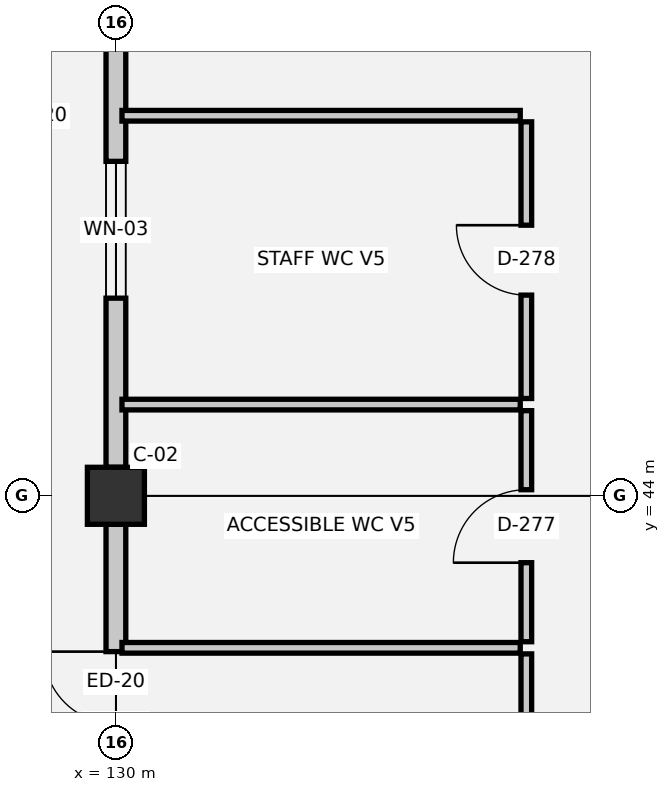
"""IFC4 building model, lengths in metres.
Left out: names, types, materials, properties, quantities, classifications, styles, units other than length and angle.
Written with IfcOpenShell. Run it as: python <this file> out.ifc"""

import sys

from ifc_helpers import new_model, si_unit, direction, frame, frame_2d, origin, origin_2d, place, context, subcontext, project, spatial, rectangle, extrude, element, fill, save


model = new_model("IFC4")
c1 = context("Model", 3, precision=1e-05, world=origin(), true_north=direction((0.0, 1.0)))
c2 = subcontext(c1, "Body", "Model", "MODEL_VIEW")
j1 = project(units=[si_unit("LENGTHUNIT", "METRE"), si_unit("PLANEANGLEUNIT", "RADIAN")], contexts=[c1])
p1 = place(None, origin())
s1 = spatial("IfcSite", under=j1, at=p1, CompositionType="ELEMENT")
p2 = place(p1, origin())
s2 = spatial("IfcBuilding", under=s1, at=p2, CompositionType="ELEMENT")
p3 = place(p2, origin())
s3 = spatial("IfcBuildingStorey", under=s2, at=p3, CompositionType="ELEMENT", Elevation=0.0)
p4 = place(p3, frame((130.0, 44.0, 0.0), z_axis=(0.0, 0.0, 1.0), x_axis=(1.0, 0.0, 0.0)))
e1 = element("IfcColumn", 1, at=p4, inside=s3, PredefinedType="COLUMN", context=c2, shape_type="SweptSolid", body=[
    extrude(rectangle(XDim=0.75, YDim=0.75, at=origin_2d()), origin(), (0.0, 0.0, 1.0), 5.4),
])
p5 = place(p3, frame((130.0, 38.375, 0.0), z_axis=(0.0, 0.0, 1.0), x_axis=(0.0, 1.0, 0.0)))
e2 = element("IfcWall", 2, at=p5, inside=s3, PredefinedType="SOLIDWALL", context=c2, shape_type="SweptSolid", body=[
    extrude(rectangle(XDim=5.25, YDim=0.26, at=frame_2d((2.625, 0.0))), origin(), (0.0, 0.0, 1.0), 4.13),
])
p6 = place(p5, frame((1.675, 0.0, 0.0)))
e3 = element("IfcOpeningElement", 3, at=p6, cuts=e2, PredefinedType="OPENING", context=c2, shape_type="SweptSolid", body=[
    extrude(rectangle(XDim=1.9, YDim=2.25, at=frame_2d((0.95, 1.125))), frame((0.0, 0.14, 0.0), z_axis=(0.0, -1.0, 0.0), x_axis=(1.0, 0.0, 0.0)), (0.0, 0.0, 1.0), 0.28),
])
p7 = place(p3, frame((130.0, 44.375, 0.0), z_axis=(0.0, 0.0, 1.0), x_axis=(0.0, 1.0, 0.0)))
e4 = element("IfcWall", 4, at=p7, inside=s3, PredefinedType="SOLIDWALL", context=c2, shape_type="SweptSolid", body=[
    extrude(rectangle(XDim=6.25, YDim=0.26, at=frame_2d((3.125, 0.0))), origin(), (0.0, 0.0, 1.0), 4.13),
])
p8 = place(p7, frame((2.225, 0.0, 0.9)))
e5 = element("IfcOpeningElement", 5, at=p8, cuts=e4, PredefinedType="OPENING", context=c2, shape_type="SweptSolid", body=[
    extrude(rectangle(XDim=1.8, YDim=2.0, at=frame_2d((0.9, 1.0))), frame((0.0, 0.14, 0.0), z_axis=(0.0, -1.0, 0.0), x_axis=(1.0, 0.0, 0.0)), (0.0, 0.0, 1.0), 0.28),
])
for number, where, z_axis, x_axis in (
    (6, (130.08, 42.0, 0.0), (0.0, 0.0, 1.0), (1.0, 0.0, 0.0)),
    (7, (130.08, 45.2, 0.0), (0.0, 0.0, 1.0), (1.0, 0.0, 0.0)),
    (8, (130.08, 49.0, 0.0), (0.0, 0.0, 1.0), (1.0, 0.0, 0.0)),
):
    element("IfcWall", number, at=place(p3, frame(where, z_axis=z_axis, x_axis=x_axis)), inside=s3, PredefinedType="PLUMBINGWALL", context=c2, shape_type="SweptSolid", body=[
        extrude(rectangle(XDim=5.24, YDim=0.14, at=frame_2d((2.62, 0.0))), origin(), (0.0, 0.0, 1.0), 5.04),
    ])
p9 = place(p3, frame((135.4, 38.08, 0.0), z_axis=(0.0, 0.0, 1.0), x_axis=(0.0, 1.0, 0.0)))
e9 = element("IfcWall", 9, at=p9, inside=s3, PredefinedType="PLUMBINGWALL", context=c2, shape_type="SweptSolid", body=[
    extrude(rectangle(XDim=3.84, YDim=0.14, at=frame_2d((1.92, 0.0))), origin(), (0.0, 0.0, 1.0), 5.04),
])
p10 = place(p9, frame((1.46, 0.0, 0.0)))
e10 = element("IfcOpeningElement", 10, at=p10, cuts=e9, PredefinedType="OPENING", context=c2, shape_type="SweptSolid", body=[
    extrude(rectangle(XDim=0.92, YDim=2.1, at=frame_2d((0.46, 1.05))), frame((0.0, 0.08, 0.0), z_axis=(0.0, -1.0, 0.0), x_axis=(1.0, 0.0, 0.0)), (0.0, 0.0, 1.0), 0.16),
])
p11 = place(p3, frame((135.4, 42.08, 0.0), z_axis=(0.0, 0.0, 1.0), x_axis=(0.0, 1.0, 0.0)))
e11 = element("IfcWall", 11, at=p11, inside=s3, PredefinedType="PLUMBINGWALL", context=c2, shape_type="SweptSolid", body=[
    extrude(rectangle(XDim=3.04, YDim=0.14, at=frame_2d((1.52, 0.0))), origin(), (0.0, 0.0, 1.0), 5.04),
])
p12 = place(p11, frame((1.04, 0.0, 0.0)))
e12 = element("IfcOpeningElement", 12, at=p12, cuts=e11, PredefinedType="OPENING", context=c2, shape_type="SweptSolid", body=[
    extrude(rectangle(XDim=0.96, YDim=2.1, at=frame_2d((0.48, 1.05))), frame((0.0, 0.08, 0.0), z_axis=(0.0, -1.0, 0.0), x_axis=(1.0, 0.0, 0.0)), (0.0, 0.0, 1.0), 0.16),
])
p13 = place(p3, frame((135.4, 45.28, 0.0), z_axis=(0.0, 0.0, 1.0), x_axis=(0.0, 1.0, 0.0)))
e13 = element("IfcWall", 13, at=p13, inside=s3, PredefinedType="PLUMBINGWALL", context=c2, shape_type="SweptSolid", body=[
    extrude(rectangle(XDim=3.64, YDim=0.14, at=frame_2d((1.82, 0.0))), origin(), (0.0, 0.0, 1.0), 5.04),
])
p14 = place(p13, frame((1.36, 0.0, 0.0)))
e14 = element("IfcOpeningElement", 14, at=p14, cuts=e13, PredefinedType="OPENING", context=c2, shape_type="SweptSolid", body=[
    extrude(rectangle(XDim=0.92, YDim=2.1, at=frame_2d((0.46, 1.05))), frame((0.0, 0.08, 0.0), z_axis=(0.0, -1.0, 0.0), x_axis=(1.0, 0.0, 0.0)), (0.0, 0.0, 1.0), 0.16),
])
p15 = place(p6, origin())
e15 = element("IfcDoor", 15, at=p15, inside=s3, OperationType="DOUBLE_DOOR_SINGLE_SWING", PredefinedType="DOOR", context=c2, shape_type="SweptSolid", body=[
    extrude(rectangle(XDim=1.9, YDim=2.25, at=frame_2d((0.95, 1.125))), frame((0.0, 0.025, 0.0), z_axis=(0.0, -1.0, 0.0), x_axis=(1.0, 0.0, 0.0)), (0.0, 0.0, 1.0), 0.05),
])
fill(e3, e15)
p16 = place(p8, origin())
e16 = element("IfcWindow", 16, at=p16, inside=s3, PartitioningType="SINGLE_PANEL", PredefinedType="WINDOW", context=c2, shape_type="SweptSolid", body=[
    extrude(rectangle(XDim=1.8, YDim=2.0, at=frame_2d((0.9, 1.0))), frame((0.0, 0.03, 0.0), z_axis=(0.0, -1.0, 0.0), x_axis=(1.0, 0.0, 0.0)), (0.0, 0.0, 1.0), 0.06),
])
fill(e5, e16)
p17 = place(p12, origin())
e17 = element("IfcDoor", 17, at=p17, inside=s3, OperationType="SINGLE_SWING_LEFT", PredefinedType="DOOR", context=c2, shape_type="SweptSolid", body=[
    extrude(rectangle(XDim=0.96, YDim=2.1, at=frame_2d((0.48, 1.05))), frame((0.0, 0.025, 0.0), z_axis=(0.0, -1.0, 0.0), x_axis=(1.0, 0.0, 0.0)), (0.0, 0.0, 1.0), 0.05),
])
fill(e12, e17)
p18 = place(p14, origin())
e18 = element("IfcDoor", 18, at=p18, inside=s3, OperationType="SINGLE_SWING_RIGHT", PredefinedType="DOOR", context=c2, shape_type="SweptSolid", body=[
    extrude(rectangle(XDim=0.92, YDim=2.1, at=frame_2d((0.46, 1.05))), frame((0.0, 0.025, 0.0), z_axis=(0.0, -1.0, 0.0), x_axis=(1.0, 0.0, 0.0)), (0.0, 0.0, 1.0), 0.05),
])
fill(e14, e18)
save(model, sys.argv[1])
